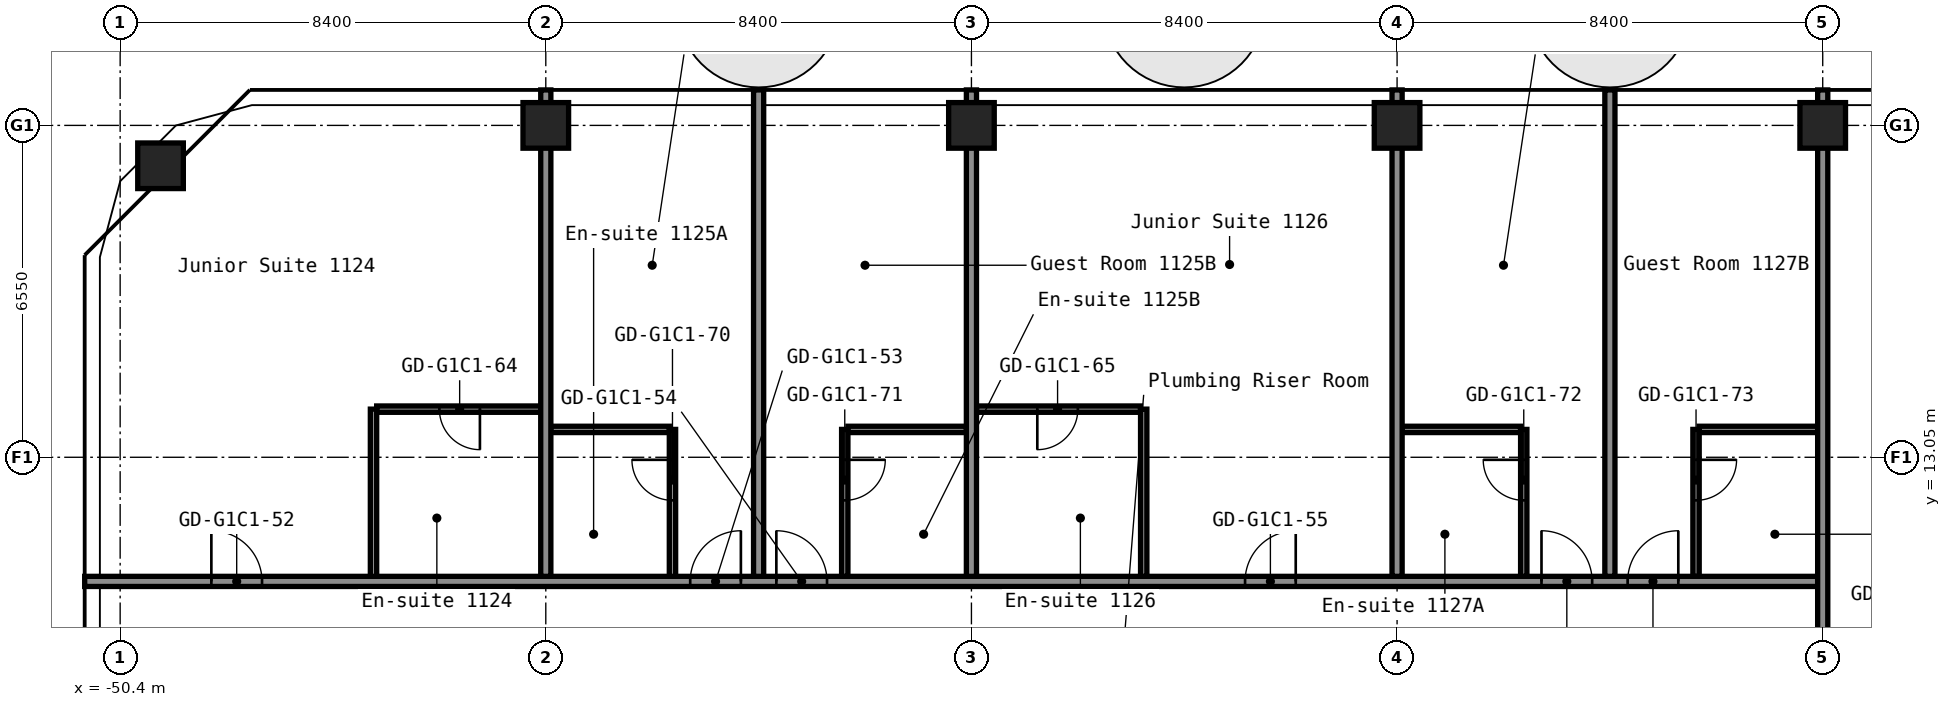
"""IFC4 building model, lengths in metres.
Left out: names, types, materials, properties, quantities, classifications, styles, units other than length and angle.
Written with IfcOpenShell. Run it as: python <this file> out.ifc"""

import sys

from ifc_helpers import new_model, si_unit, direction, frame, frame_2d, origin, origin_2d, place, context, subcontext, project, spatial, rectangle, hollow_rectangle, extrude, element, fill, save


model = new_model("IFC4")
c1 = context("Model", 3, precision=1e-05, world=origin(), true_north=direction((0.0, 1.0)))
c2 = subcontext(c1, "Body", "Model", "MODEL_VIEW")
j1 = project(units=[si_unit("LENGTHUNIT", "METRE"), si_unit("PLANEANGLEUNIT", "RADIAN")], contexts=[c1])
p1 = place(None, origin())
s1 = spatial("IfcSite", under=j1, at=p1, CompositionType="ELEMENT")
p2 = place(p1, origin())
s2 = spatial("IfcBuilding", under=s1, at=p2, CompositionType="ELEMENT")
p3 = place(p2, frame((0.0, 0.0, 42.2)))
s3 = spatial("IfcBuildingStorey", under=s2, at=p3, CompositionType="ELEMENT", Elevation=42.2)
for number, where, z_axis, x_axis in (
    (1, (-49.603, 18.803, 0.0), (0.0, 0.0, 1.0), (1.0, 0.0, 0.0)),
    (2, (-42.0, 19.6, 0.0), (0.0, 0.0, 1.0), (1.0, 0.0, 0.0)),
    (3, (-33.6, 19.6, 0.0), (0.0, 0.0, 1.0), (1.0, 0.0, 0.0)),
    (4, (-25.2, 19.6, 0.0), (0.0, 0.0, 1.0), (1.0, 0.0, 0.0)),
    (5, (-16.8, 19.6, 0.0), (0.0, 0.0, 1.0), (1.0, 0.0, 0.0)),
):
    element("IfcColumn", number, at=place(p3, frame(where, z_axis=z_axis, x_axis=x_axis)), inside=s3, PredefinedType="COLUMN", context=c2, shape_type="SweptSolid", body=[
        extrude(hollow_rectangle(XDim=0.9, YDim=0.9, WallThickness=0.036, at=origin_2d()), origin(), (0.0, 0.0, 1.0), 2.8),
    ])
p4 = place(p3, frame((-51.1, 10.6, 0.0), z_axis=(0.0, 0.0, 1.0), x_axis=(1.0, 0.0, 0.0)))
e6 = element("IfcWall", 6, at=p4, inside=s3, PredefinedType="PARTITIONING", context=c2, shape_type="SweptSolid", body=[
    extrude(rectangle(XDim=34.3, YDim=0.2, at=frame_2d((17.15, 0.0))), origin(), (0.0, 0.0, 1.0), 2.8),
])
p5 = place(p4, frame((2.5, 0.0, 0.0)))
e7 = element("IfcOpeningElement", 7, at=p5, cuts=e6, PredefinedType="OPENING", context=c2, shape_type="SweptSolid", body=[
    extrude(rectangle(XDim=1.0, YDim=2.1, at=frame_2d((0.5, 1.05))), frame((0.0, 0.11, 0.0), z_axis=(0.0, -1.0, 0.0), x_axis=(1.0, 0.0, 0.0)), (0.0, 0.0, 1.0), 0.22),
])
p6 = place(p4, frame((11.95, 0.0, 0.0)))
e8 = element("IfcOpeningElement", 8, at=p6, cuts=e6, PredefinedType="OPENING", context=c2, shape_type="SweptSolid", body=[
    extrude(rectangle(XDim=1.0, YDim=2.1, at=frame_2d((0.5, 1.05))), frame((0.0, 0.11, 0.0), z_axis=(0.0, -1.0, 0.0), x_axis=(1.0, 0.0, 0.0)), (0.0, 0.0, 1.0), 0.22),
])
p7 = place(p4, frame((13.65, 0.0, 0.0)))
e9 = element("IfcOpeningElement", 9, at=p7, cuts=e6, PredefinedType="OPENING", context=c2, shape_type="SweptSolid", body=[
    extrude(rectangle(XDim=1.0, YDim=2.1, at=frame_2d((0.5, 1.05))), frame((0.0, 0.11, 0.0), z_axis=(0.0, -1.0, 0.0), x_axis=(1.0, 0.0, 0.0)), (0.0, 0.0, 1.0), 0.22),
])
p8 = place(p4, frame((22.9, 0.0, 0.0)))
e10 = element("IfcOpeningElement", 10, at=p8, cuts=e6, PredefinedType="OPENING", context=c2, shape_type="SweptSolid", body=[
    extrude(rectangle(XDim=1.0, YDim=2.1, at=frame_2d((0.5, 1.05))), frame((0.0, 0.11, 0.0), z_axis=(0.0, -1.0, 0.0), x_axis=(1.0, 0.0, 0.0)), (0.0, 0.0, 1.0), 0.22),
])
p9 = place(p4, frame((28.75, 0.0, 0.0)))
e11 = element("IfcOpeningElement", 11, at=p9, cuts=e6, PredefinedType="OPENING", context=c2, shape_type="SweptSolid", body=[
    extrude(rectangle(XDim=1.0, YDim=2.1, at=frame_2d((0.5, 1.05))), frame((0.0, 0.11, 0.0), z_axis=(0.0, -1.0, 0.0), x_axis=(1.0, 0.0, 0.0)), (0.0, 0.0, 1.0), 0.22),
])
p10 = place(p4, frame((30.45, 0.0, 0.0)))
e12 = element("IfcOpeningElement", 12, at=p10, cuts=e6, PredefinedType="OPENING", context=c2, shape_type="SweptSolid", body=[
    extrude(rectangle(XDim=1.0, YDim=2.1, at=frame_2d((0.5, 1.05))), frame((0.0, 0.11, 0.0), z_axis=(0.0, -1.0, 0.0), x_axis=(1.0, 0.0, 0.0)), (0.0, 0.0, 1.0), 0.22),
])
p11 = place(p3, frame((-41.9, 13.6, 0.0), z_axis=(0.0, 0.0, 1.0), x_axis=(1.0, 0.0, 0.0)))
e13 = element("IfcWall", 13, at=p11, inside=s3, PredefinedType="PARTITIONING", context=c2, shape_type="SweptSolid", body=[
    extrude(rectangle(XDim=2.337, YDim=0.125, at=frame_2d((1.169, 0.0))), origin(), (0.0, 0.0, 1.0), 2.8),
])
for number, where, z_axis, x_axis in (
    (14, (-36.038, 13.6, 0.0), (0.0, 0.0, 1.0), (1.0, 0.0, 0.0)),
    (15, (-25.1, 13.6, 0.0), (0.0, 0.0, 1.0), (1.0, 0.0, 0.0)),
    (16, (-19.238, 13.6, 0.0), (0.0, 0.0, 1.0), (1.0, 0.0, 0.0)),
):
    element("IfcWall", number, at=place(p3, frame(where, z_axis=z_axis, x_axis=x_axis)), inside=s3, PredefinedType="PARTITIONING", context=c2, shape_type="SweptSolid", body=[
        extrude(rectangle(XDim=2.338, YDim=0.125, at=frame_2d((1.169, 0.0))), origin(), (0.0, 0.0, 1.0), 2.8),
    ])
p12 = place(p3, frame((-45.337, 14.0, 0.0), z_axis=(0.0, 0.0, 1.0), x_axis=(1.0, 0.0, 0.0)))
e17 = element("IfcWall", 17, at=p12, inside=s3, PredefinedType="PARTITIONING", context=c2, shape_type="SweptSolid", body=[
    extrude(rectangle(XDim=3.237, YDim=0.125, at=frame_2d((1.619, 0.0))), origin(), (0.0, 0.0, 1.0), 2.8),
])
p13 = place(p12, frame((1.238, 0.0, 0.0)))
e18 = element("IfcOpeningElement", 18, at=p13, cuts=e17, PredefinedType="OPENING", context=c2, shape_type="SweptSolid", body=[
    extrude(rectangle(XDim=0.8, YDim=2.1, at=frame_2d((0.4, 1.05))), frame((0.0, 0.073, 0.0), z_axis=(0.0, -1.0, 0.0), x_axis=(1.0, 0.0, 0.0)), (0.0, 0.0, 1.0), 0.145),
])
p14 = place(p3, frame((-33.5, 14.0, 0.0), z_axis=(0.0, 0.0, 1.0), x_axis=(1.0, 0.0, 0.0)))
e19 = element("IfcWall", 19, at=p14, inside=s3, PredefinedType="PARTITIONING", context=c2, shape_type="SweptSolid", body=[
    extrude(rectangle(XDim=3.238, YDim=0.125, at=frame_2d((1.619, 0.0))), origin(), (0.0, 0.0, 1.0), 2.8),
])
p15 = place(p14, frame((1.2, 0.0, 0.0)))
e20 = element("IfcOpeningElement", 20, at=p15, cuts=e19, PredefinedType="OPENING", context=c2, shape_type="SweptSolid", body=[
    extrude(rectangle(XDim=0.8, YDim=2.1, at=frame_2d((0.4, 1.05))), frame((0.0, 0.073, 0.0), z_axis=(0.0, -1.0, 0.0), x_axis=(1.0, 0.0, 0.0)), (0.0, 0.0, 1.0), 0.145),
])
p16 = place(p3, frame((-45.4, 10.7, 0.0), z_axis=(0.0, 0.0, 1.0), x_axis=(0.0, 1.0, 0.0)))
e21 = element("IfcWall", 21, at=p16, inside=s3, PredefinedType="PARTITIONING", context=c2, shape_type="SweptSolid", body=[
    extrude(rectangle(XDim=3.3, YDim=0.125, at=frame_2d((1.65, 0.0))), origin(), (0.0, 0.0, 1.0), 2.8),
])
p17 = place(p3, frame((-42.0, 10.7, 0.0), z_axis=(0.0, 0.0, 1.0), x_axis=(0.0, 1.0, 0.0)))
e22 = element("IfcWall", 22, at=p17, inside=s3, PredefinedType="PARTITIONING", context=c2, shape_type="SweptSolid", body=[
    extrude(rectangle(XDim=9.6, YDim=0.2, at=frame_2d((4.8, 0.0))), origin(), (0.0, 0.0, 1.0), 2.8),
])
p18 = place(p3, frame((-39.5, 10.7, 0.0), z_axis=(0.0, 0.0, 1.0), x_axis=(0.0, 1.0, 0.0)))
e23 = element("IfcWall", 23, at=p18, inside=s3, PredefinedType="PARTITIONING", context=c2, shape_type="SweptSolid", body=[
    extrude(rectangle(XDim=2.9, YDim=0.125, at=frame_2d((1.45, 0.0))), origin(), (0.0, 0.0, 1.0), 2.8),
])
p19 = place(p18, frame((1.5, 0.0, 0.0)))
e24 = element("IfcOpeningElement", 24, at=p19, cuts=e23, PredefinedType="OPENING", context=c2, shape_type="SweptSolid", body=[
    extrude(rectangle(XDim=0.8, YDim=2.1, at=frame_2d((0.4, 1.05))), frame((0.0, 0.073, 0.0), z_axis=(0.0, -1.0, 0.0), x_axis=(1.0, 0.0, 0.0)), (0.0, 0.0, 1.0), 0.145),
])
p20 = place(p3, frame((-37.8, 10.7, 0.0), z_axis=(0.0, 0.0, 1.0), x_axis=(0.0, 1.0, 0.0)))
e25 = element("IfcWall", 25, at=p20, inside=s3, PredefinedType="PARTITIONING", context=c2, shape_type="SweptSolid", body=[
    extrude(rectangle(XDim=9.6, YDim=0.2, at=frame_2d((4.8, 0.0))), origin(), (0.0, 0.0, 1.0), 2.8),
])
p21 = place(p3, frame((-36.1, 10.7, 0.0), z_axis=(0.0, 0.0, 1.0), x_axis=(0.0, 1.0, 0.0)))
e26 = element("IfcWall", 26, at=p21, inside=s3, PredefinedType="PARTITIONING", context=c2, shape_type="SweptSolid", body=[
    extrude(rectangle(XDim=2.9, YDim=0.125, at=frame_2d((1.45, 0.0))), origin(), (0.0, 0.0, 1.0), 2.8),
])
p22 = place(p21, frame((1.5, 0.0, 0.0)))
e27 = element("IfcOpeningElement", 27, at=p22, cuts=e26, PredefinedType="OPENING", context=c2, shape_type="SweptSolid", body=[
    extrude(rectangle(XDim=0.8, YDim=2.1, at=frame_2d((0.4, 1.05))), frame((0.0, 0.073, 0.0), z_axis=(0.0, -1.0, 0.0), x_axis=(1.0, 0.0, 0.0)), (0.0, 0.0, 1.0), 0.145),
])
p23 = place(p3, frame((-33.6, 10.7, 0.0), z_axis=(0.0, 0.0, 1.0), x_axis=(0.0, 1.0, 0.0)))
e28 = element("IfcWall", 28, at=p23, inside=s3, PredefinedType="PARTITIONING", context=c2, shape_type="SweptSolid", body=[
    extrude(rectangle(XDim=9.6, YDim=0.2, at=frame_2d((4.8, 0.0))), origin(), (0.0, 0.0, 1.0), 2.8),
])
p24 = place(p3, frame((-30.2, 10.7, 0.0), z_axis=(0.0, 0.0, 1.0), x_axis=(0.0, 1.0, 0.0)))
e29 = element("IfcWall", 29, at=p24, inside=s3, PredefinedType="PARTITIONING", context=c2, shape_type="SweptSolid", body=[
    extrude(rectangle(XDim=3.3, YDim=0.125, at=frame_2d((1.65, 0.0))), origin(), (0.0, 0.0, 1.0), 2.8),
])
p25 = place(p3, frame((-25.2, 10.7, 0.0), z_axis=(0.0, 0.0, 1.0), x_axis=(0.0, 1.0, 0.0)))
e30 = element("IfcWall", 30, at=p25, inside=s3, PredefinedType="PARTITIONING", context=c2, shape_type="SweptSolid", body=[
    extrude(rectangle(XDim=9.6, YDim=0.2, at=frame_2d((4.8, 0.0))), origin(), (0.0, 0.0, 1.0), 2.8),
])
p26 = place(p3, frame((-22.7, 10.7, 0.0), z_axis=(0.0, 0.0, 1.0), x_axis=(0.0, 1.0, 0.0)))
e31 = element("IfcWall", 31, at=p26, inside=s3, PredefinedType="PARTITIONING", context=c2, shape_type="SweptSolid", body=[
    extrude(rectangle(XDim=2.9, YDim=0.125, at=frame_2d((1.45, 0.0))), origin(), (0.0, 0.0, 1.0), 2.8),
])
p27 = place(p26, frame((1.5, 0.0, 0.0)))
e32 = element("IfcOpeningElement", 32, at=p27, cuts=e31, PredefinedType="OPENING", context=c2, shape_type="SweptSolid", body=[
    extrude(rectangle(XDim=0.8, YDim=2.1, at=frame_2d((0.4, 1.05))), frame((0.0, 0.073, 0.0), z_axis=(0.0, -1.0, 0.0), x_axis=(1.0, 0.0, 0.0)), (0.0, 0.0, 1.0), 0.145),
])
p28 = place(p3, frame((-21.0, 10.7, 0.0), z_axis=(0.0, 0.0, 1.0), x_axis=(0.0, 1.0, 0.0)))
e33 = element("IfcWall", 33, at=p28, inside=s3, PredefinedType="PARTITIONING", context=c2, shape_type="SweptSolid", body=[
    extrude(rectangle(XDim=9.6, YDim=0.2, at=frame_2d((4.8, 0.0))), origin(), (0.0, 0.0, 1.0), 2.8),
])
p29 = place(p3, frame((-19.3, 10.7, 0.0), z_axis=(0.0, 0.0, 1.0), x_axis=(0.0, 1.0, 0.0)))
e34 = element("IfcWall", 34, at=p29, inside=s3, PredefinedType="PARTITIONING", context=c2, shape_type="SweptSolid", body=[
    extrude(rectangle(XDim=2.9, YDim=0.125, at=frame_2d((1.45, 0.0))), origin(), (0.0, 0.0, 1.0), 2.8),
])
p30 = place(p29, frame((1.5, 0.0, 0.0)))
e35 = element("IfcOpeningElement", 35, at=p30, cuts=e34, PredefinedType="OPENING", context=c2, shape_type="SweptSolid", body=[
    extrude(rectangle(XDim=0.8, YDim=2.1, at=frame_2d((0.4, 1.05))), frame((0.0, 0.073, 0.0), z_axis=(0.0, -1.0, 0.0), x_axis=(1.0, 0.0, 0.0)), (0.0, 0.0, 1.0), 0.145),
])
p31 = place(p3, frame((-16.8, 8.39, 0.0), z_axis=(0.0, 0.0, 1.0), x_axis=(0.0, 1.0, 0.0)))
e36 = element("IfcWall", 36, at=p31, inside=s3, PredefinedType="PARTITIONING", context=c2, shape_type="SweptSolid", body=[
    extrude(rectangle(XDim=11.91, YDim=0.2, at=frame_2d((5.955, 0.0))), origin(), (0.0, 0.0, 1.0), 2.8),
])
p32 = place(p5, origin())
e37 = element("IfcDoor", 37, at=p32, inside=s3, OperationType="SINGLE_SWING_RIGHT", PredefinedType="DOOR", context=c2, shape_type="SweptSolid", body=[
    extrude(rectangle(XDim=1.0, YDim=2.1, at=frame_2d((0.5, 1.05))), frame((0.0, 0.025, 0.0), z_axis=(0.0, -1.0, 0.0), x_axis=(1.0, 0.0, 0.0)), (0.0, 0.0, 1.0), 0.05),
])
fill(e7, e37)
p33 = place(p6, origin())
e38 = element("IfcDoor", 38, at=p33, inside=s3, OperationType="SINGLE_SWING_LEFT", PredefinedType="DOOR", context=c2, shape_type="SweptSolid", body=[
    extrude(rectangle(XDim=1.0, YDim=2.1, at=frame_2d((0.5, 1.05))), frame((0.0, 0.025, 0.0), z_axis=(0.0, -1.0, 0.0), x_axis=(1.0, 0.0, 0.0)), (0.0, 0.0, 1.0), 0.05),
])
fill(e8, e38)
p34 = place(p7, origin())
e39 = element("IfcDoor", 39, at=p34, inside=s3, OperationType="SINGLE_SWING_RIGHT", PredefinedType="DOOR", context=c2, shape_type="SweptSolid", body=[
    extrude(rectangle(XDim=1.0, YDim=2.1, at=frame_2d((0.5, 1.05))), frame((0.0, 0.025, 0.0), z_axis=(0.0, -1.0, 0.0), x_axis=(1.0, 0.0, 0.0)), (0.0, 0.0, 1.0), 0.05),
])
fill(e9, e39)
p35 = place(p8, origin())
e40 = element("IfcDoor", 40, at=p35, inside=s3, OperationType="SINGLE_SWING_LEFT", PredefinedType="DOOR", context=c2, shape_type="SweptSolid", body=[
    extrude(rectangle(XDim=1.0, YDim=2.1, at=frame_2d((0.5, 1.05))), frame((0.0, 0.025, 0.0), z_axis=(0.0, -1.0, 0.0), x_axis=(1.0, 0.0, 0.0)), (0.0, 0.0, 1.0), 0.05),
])
fill(e10, e40)
p36 = place(p9, origin())
e41 = element("IfcDoor", 41, at=p36, inside=s3, OperationType="SINGLE_SWING_RIGHT", PredefinedType="DOOR", context=c2, shape_type="SweptSolid", body=[
    extrude(rectangle(XDim=1.0, YDim=2.1, at=frame_2d((0.5, 1.05))), frame((0.0, 0.025, 0.0), z_axis=(0.0, -1.0, 0.0), x_axis=(1.0, 0.0, 0.0)), (0.0, 0.0, 1.0), 0.05),
])
fill(e11, e41)
p37 = place(p10, origin())
e42 = element("IfcDoor", 42, at=p37, inside=s3, OperationType="SINGLE_SWING_LEFT", PredefinedType="DOOR", context=c2, shape_type="SweptSolid", body=[
    extrude(rectangle(XDim=1.0, YDim=2.1, at=frame_2d((0.5, 1.05))), frame((0.0, 0.025, 0.0), z_axis=(0.0, -1.0, 0.0), x_axis=(1.0, 0.0, 0.0)), (0.0, 0.0, 1.0), 0.05),
])
fill(e12, e42)
p38 = place(p13, origin())
e43 = element("IfcDoor", 43, at=p38, inside=s3, OperationType="SINGLE_SWING_RIGHT", PredefinedType="DOOR", context=c2, shape_type="SweptSolid", body=[
    extrude(rectangle(XDim=0.8, YDim=2.1, at=frame_2d((0.4, 1.05))), frame((0.0, 0.025, 0.0), z_axis=(0.0, -1.0, 0.0), x_axis=(1.0, 0.0, 0.0)), (0.0, 0.0, 1.0), 0.05),
])
fill(e18, e43)
p39 = place(p15, origin())
e44 = element("IfcDoor", 44, at=p39, inside=s3, OperationType="SINGLE_SWING_LEFT", PredefinedType="DOOR", context=c2, shape_type="SweptSolid", body=[
    extrude(rectangle(XDim=0.8, YDim=2.1, at=frame_2d((0.4, 1.05))), frame((0.0, 0.025, 0.0), z_axis=(0.0, -1.0, 0.0), x_axis=(1.0, 0.0, 0.0)), (0.0, 0.0, 1.0), 0.05),
])
fill(e20, e44)
p40 = place(p19, origin())
e45 = element("IfcDoor", 45, at=p40, inside=s3, OperationType="SINGLE_SWING_LEFT", PredefinedType="DOOR", context=c2, shape_type="SweptSolid", body=[
    extrude(rectangle(XDim=0.8, YDim=2.1, at=frame_2d((0.4, 1.05))), frame((0.0, 0.025, 0.0), z_axis=(0.0, -1.0, 0.0), x_axis=(1.0, 0.0, 0.0)), (0.0, 0.0, 1.0), 0.05),
])
fill(e24, e45)
p41 = place(p22, origin())
e46 = element("IfcDoor", 46, at=p41, inside=s3, OperationType="SINGLE_SWING_RIGHT", PredefinedType="DOOR", context=c2, shape_type="SweptSolid", body=[
    extrude(rectangle(XDim=0.8, YDim=2.1, at=frame_2d((0.4, 1.05))), frame((0.0, 0.025, 0.0), z_axis=(0.0, -1.0, 0.0), x_axis=(1.0, 0.0, 0.0)), (0.0, 0.0, 1.0), 0.05),
])
fill(e27, e46)
p42 = place(p27, origin())
e47 = element("IfcDoor", 47, at=p42, inside=s3, OperationType="SINGLE_SWING_LEFT", PredefinedType="DOOR", context=c2, shape_type="SweptSolid", body=[
    extrude(rectangle(XDim=0.8, YDim=2.1, at=frame_2d((0.4, 1.05))), frame((0.0, 0.025, 0.0), z_axis=(0.0, -1.0, 0.0), x_axis=(1.0, 0.0, 0.0)), (0.0, 0.0, 1.0), 0.05),
])
fill(e32, e47)
p43 = place(p30, origin())
e48 = element("IfcDoor", 48, at=p43, inside=s3, OperationType="SINGLE_SWING_RIGHT", PredefinedType="DOOR", context=c2, shape_type="SweptSolid", body=[
    extrude(rectangle(XDim=0.8, YDim=2.1, at=frame_2d((0.4, 1.05))), frame((0.0, 0.025, 0.0), z_axis=(0.0, -1.0, 0.0), x_axis=(1.0, 0.0, 0.0)), (0.0, 0.0, 1.0), 0.05),
])
fill(e35, e48)
save(model, sys.argv[1])
